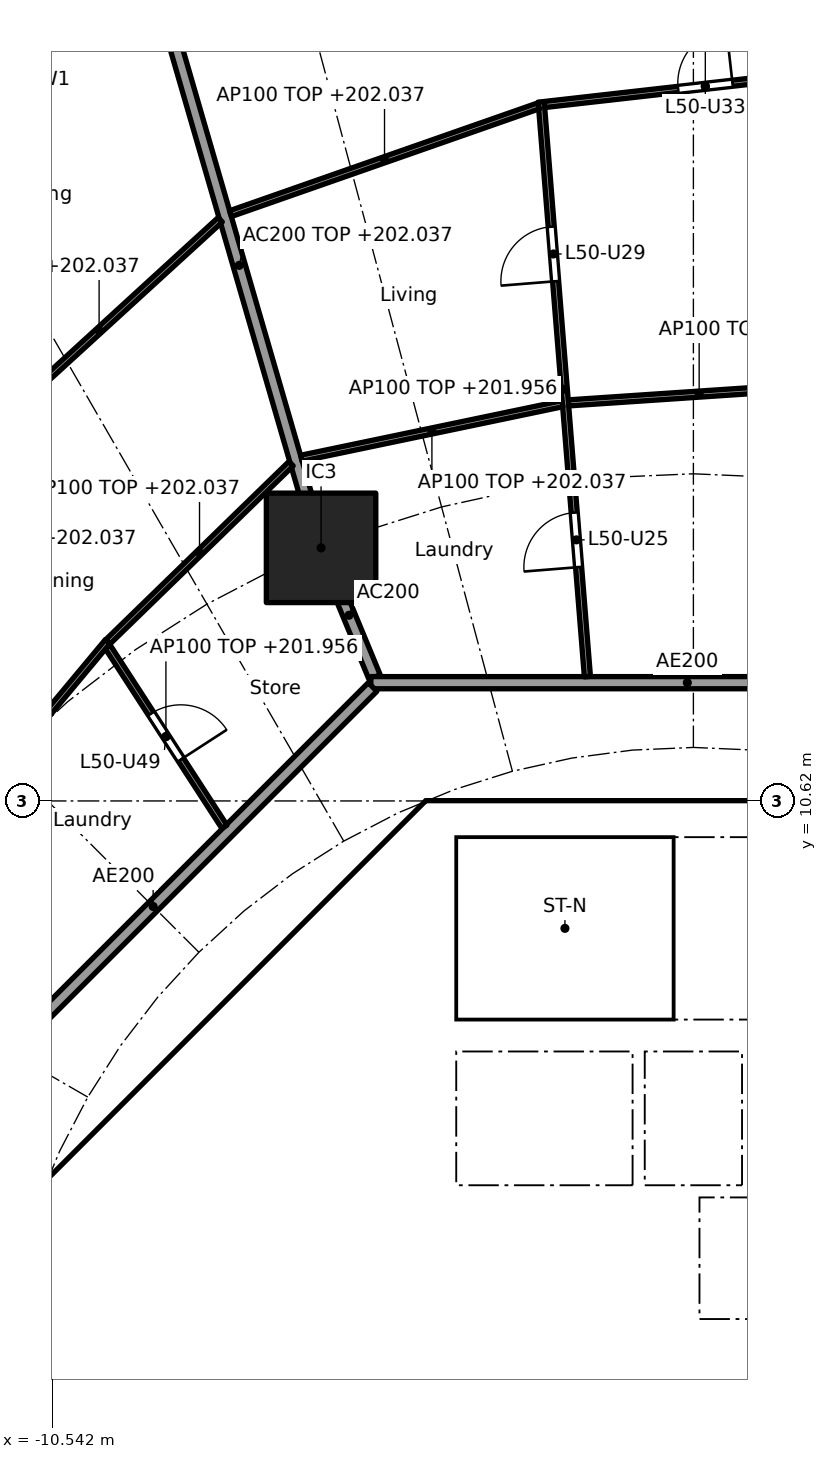
"""IFC4 building model, lengths in metres.
Left out: names, types, materials, properties, quantities, classifications, styles, units other than length and angle.
Written with IfcOpenShell. Run it as: python <this file> out.ifc"""

import sys

from ifc_helpers import new_model, si_unit, direction, frame, frame_2d, origin, origin_2d, place, context, subcontext, project, spatial, polyline, rectangle, outline, extrude, element, fill, save


model = new_model("IFC4")
c1 = context("Model", 3, precision=1e-05, world=origin(), true_north=direction((0.0, 1.0)))
c2 = subcontext(c1, "Body", "Model", "MODEL_VIEW")
j1 = project(units=[si_unit("LENGTHUNIT", "METRE"), si_unit("PLANEANGLEUNIT", "RADIAN")], contexts=[c1])
p1 = place(None, origin())
s1 = spatial("IfcSite", under=j1, at=p1, CompositionType="ELEMENT")
p2 = place(p1, origin())
s2 = spatial("IfcBuilding", under=s1, at=p2, CompositionType="ELEMENT")
p3 = place(p2, frame((0.0, 0.0, 199.2)))
s3 = spatial("IfcBuildingStorey", under=s2, at=p3, CompositionType="ELEMENT", Elevation=199.2)
p4 = place(p3, frame((-6.123, 14.782, 0.0), z_axis=(0.0, 0.0, 1.0), x_axis=(1.0, 0.0, 0.0)))
e1 = element("IfcColumn", 1, at=p4, inside=s3, PredefinedType="COLUMN", context=c2, shape_type="SweptSolid", body=[
    extrude(rectangle(XDim=1.8, YDim=1.8, at=origin_2d()), origin(), (0.0, 0.0, 1.0), 3.7),
])
p5 = place(p3, frame((-11.772, 22.809, 0.0), z_axis=(0.0, 0.0, 1.0), x_axis=(0.796055733703, 0.60522332146, 0.0)))
e2 = element("IfcWall", 2, at=p5, inside=s3, PredefinedType="SOLIDWALL", context=c2, shape_type="SweptSolid", body=[
    extrude(rectangle(XDim=2.917, YDim=0.25, at=frame_2d((1.458, 0.0))), origin(), (0.0, 0.0, 1.0), 3.44),
])
p6 = place(p5, frame((0.408, 0.0, 0.0)))
e3 = element("IfcOpeningElement", 3, at=p6, cuts=e2, PredefinedType="OPENING", context=c2, shape_type="SweptSolid", body=[
    extrude(rectangle(XDim=2.1, YDim=2.4, at=frame_2d((1.05, 1.2))), frame((0.0, 0.135, 0.0), z_axis=(0.0, -1.0, 0.0), x_axis=(1.0, 0.0, 0.0)), (0.0, 0.0, 1.0), 0.27),
])
p7 = place(p3, frame((-4.613, 9.988, 0.0), z_axis=(0.0, 0.0, 1.0), x_axis=(-0.707106781187, -0.707106781187, 0.0)))
e4 = element("IfcWall", 4, at=p7, inside=s3, PredefinedType="SHEAR", context=c2, shape_type="SweptSolid", body=[
    extrude(rectangle(XDim=7.602, YDim=0.6, at=frame_2d((3.801, 0.0))), origin(), (0.0, 0.0, 1.0), 3.44),
])
p8 = place(p7, frame((0.351, 0.0, 0.0)))
e5 = element("IfcOpeningElement", 5, at=p8, cuts=e4, PredefinedType="OPENING", context=c2, shape_type="SweptSolid", body=[
    extrude(rectangle(XDim=1.1, YDim=2.1, at=frame_2d((0.55, 1.05))), frame((0.0, 0.31, 0.0), z_axis=(0.0, -1.0, 0.0), x_axis=(1.0, 0.0, 0.0)), (0.0, 0.0, 1.0), 0.62),
])
p9 = place(p3, frame((-10.325, 3.801, 0.0), z_axis=(0.0, 0.0, 1.0), x_axis=(0.0, -1.0, 0.0)))
e6 = element("IfcWall", 6, at=p9, inside=s3, PredefinedType="SHEAR", context=c2, shape_type="SweptSolid", body=[
    extrude(rectangle(XDim=7.602, YDim=0.6, at=frame_2d((3.801, 0.0))), origin(), (0.0, 0.0, 1.0), 3.44),
])
p10 = place(p9, frame((0.651, 0.0, 0.0)))
e7 = element("IfcOpeningElement", 7, at=p10, cuts=e6, PredefinedType="OPENING", context=c2, shape_type="SweptSolid", body=[
    extrude(rectangle(XDim=1.5, YDim=2.1, at=frame_2d((0.75, 1.05))), frame((0.0, 0.31, 0.0), z_axis=(0.0, -1.0, 0.0), x_axis=(1.0, 0.0, 0.0)), (0.0, 0.0, 1.0), 0.62),
])
p11 = place(p9, frame((5.451, 0.0, 0.0)))
e8 = element("IfcOpeningElement", 8, at=p11, cuts=e6, PredefinedType="OPENING", context=c2, shape_type="SweptSolid", body=[
    extrude(rectangle(XDim=1.5, YDim=2.1, at=frame_2d((0.75, 1.05))), frame((0.0, 0.31, 0.0), z_axis=(0.0, -1.0, 0.0), x_axis=(1.0, 0.0, 0.0)), (0.0, 0.0, 1.0), 0.62),
])
p12 = place(p3, frame((-5.8, 4.3, 0.0), z_axis=(0.0, 0.0, 1.0), x_axis=(0.0, 1.0, 0.0)))
e9 = element("IfcWall", 9, at=p12, inside=s3, PredefinedType="PARTITIONING", context=c2, shape_type="SweptSolid", body=[
    extrude(rectangle(XDim=3.927, YDim=0.15, at=frame_2d((1.963, 0.0))), origin(), (0.0, 0.0, 1.0), 3.44),
])
p13 = place(p12, frame((1.551, 0.0, 0.0)))
e10 = element("IfcOpeningElement", 10, at=p13, cuts=e9, PredefinedType="OPENING", context=c2, shape_type="SweptSolid", body=[
    extrude(rectangle(XDim=0.9, YDim=2.1, at=frame_2d((0.45, 1.05))), frame((0.0, 0.085, 0.0), z_axis=(0.0, -1.0, 0.0), x_axis=(1.0, 0.0, 0.0)), (0.0, 0.0, 1.0), 0.17),
])
p14 = place(p3, frame((-4.0, 4.3, 0.0), z_axis=(0.0, 0.0, 1.0), x_axis=(0.0, 1.0, 0.0)))
e11 = element("IfcWall", 11, at=p14, inside=s3, PredefinedType="SOLIDWALL", context=c2, shape_type="SweptSolid", body=[
    extrude(rectangle(XDim=2.2, YDim=0.2, at=frame_2d((1.1, 0.0))), origin(), (0.0, 0.0, 1.0), 3.44),
])
p15 = place(p14, frame((0.55, 0.0, 0.0)))
e12 = element("IfcOpeningElement", 12, at=p15, cuts=e11, PredefinedType="OPENING", context=c2, shape_type="SweptSolid", body=[
    extrude(rectangle(XDim=1.1, YDim=2.1, at=frame_2d((0.55, 1.05))), frame((0.0, 0.11, 0.0), z_axis=(0.0, -1.0, 0.0), x_axis=(1.0, 0.0, 0.0)), (0.0, 0.0, 1.0), 0.22),
])
p16 = place(p3, frame((-6.7, 2.0, 0.0), z_axis=(0.0, 0.0, 1.0), x_axis=(1.0, 0.0, 0.0)))
e13 = element("IfcWall", 13, at=p16, inside=s3, PredefinedType="SOLIDWALL", context=c2, shape_type="SweptSolid", body=[
    extrude(rectangle(XDim=13.4, YDim=0.2, at=frame_2d((6.7, 0.0))), origin(), (0.0, 0.0, 1.0), 3.44),
])
p17 = place(p16, frame((7.25, 0.0, 0.0)))
e14 = element("IfcOpeningElement", 14, at=p17, cuts=e13, PredefinedType="OPENING", context=c2, shape_type="SweptSolid", body=[
    extrude(rectangle(XDim=1.1, YDim=2.1, at=frame_2d((0.55, 1.05))), frame((0.0, 0.11, 0.0), z_axis=(0.0, -1.0, 0.0), x_axis=(1.0, 0.0, 0.0)), (0.0, 0.0, 1.0), 0.22),
])
p18 = place(p16, frame((9.45, 0.0, 0.0)))
e15 = element("IfcOpeningElement", 15, at=p18, cuts=e13, PredefinedType="OPENING", context=c2, shape_type="SweptSolid", body=[
    extrude(rectangle(XDim=1.1, YDim=2.1, at=frame_2d((0.55, 1.05))), frame((0.0, 0.11, 0.0), z_axis=(0.0, -1.0, 0.0), x_axis=(1.0, 0.0, 0.0)), (0.0, 0.0, 1.0), 0.22),
])
p19 = place(p16, frame((2.95, 0.0, 0.0)))
e16 = element("IfcOpeningElement", 16, at=p19, cuts=e13, PredefinedType="OPENING", context=c2, shape_type="SweptSolid", body=[
    extrude(rectangle(XDim=0.9, YDim=2.1, at=frame_2d((0.45, 1.05))), frame((0.0, 0.11, 0.0), z_axis=(0.0, -1.0, 0.0), x_axis=(1.0, 0.0, 0.0)), (0.0, 0.0, 1.0), 0.22),
])
p20 = place(p3, origin())
e17 = element("IfcWall", 17, at=p20, inside=s3, PredefinedType="SHEAR", context=c2, shape_type="SweptSolid", body=[
    extrude(outline(polyline([(-10.2, 4.825), (-9.776, 4.401), (-10.025, 4.152), (-10.025, 3.801), (-10.625, 3.801), (-10.625, 4.401), (-10.2, 4.825)])), origin(), (0.0, 0.0, 1.0), 3.44),
])
p21 = place(p3, origin())
e18 = element("IfcWall", 18, at=p21, inside=s3, PredefinedType="SHEAR", context=c2, shape_type="SweptSolid", body=[
    extrude(outline(polyline([(-4.152, 10.025), (-4.401, 9.776), (-4.825, 10.2), (-4.401, 10.625), (4.401, 10.625), (4.825, 10.2), (4.401, 9.776), (4.152, 10.025), (-4.152, 10.025)])), origin(), (0.0, 0.0, 1.0), 3.44),
])
for number, where, z_axis, x_axis in (
    (19, (-0.9, 4.3, 0.0), (0.0, 0.0, 1.0), (0.0, 1.0, 0.0)),
    (20, (0.9, 4.3, 0.0), (0.0, 0.0, 1.0), (0.0, 1.0, 0.0)),
):
    element("IfcWall", number, at=place(p3, frame(where, z_axis=z_axis, x_axis=x_axis)), inside=s3, PredefinedType="SOLIDWALL", context=c2, shape_type="SweptSolid", body=[
        extrude(rectangle(XDim=2.2, YDim=0.2, at=frame_2d((1.1, 0.0))), origin(), (0.0, 0.0, 1.0), 3.44),
    ])
p22 = place(p3, origin())
e21 = element("IfcWall", 21, at=p22, inside=s3, PredefinedType="SOLIDWALL", context=c2, shape_type="SweptSolid", body=[
    extrude(outline(polyline([(-6.7, 4.3), (6.7, 4.3), (6.7, 2.1), (6.5, 2.1), (6.5, 4.1), (4.5, 4.1), (4.5, 2.1), (4.3, 2.1), (4.3, 4.1), (2.3, 4.1), (2.3, 2.1), (2.1, 2.1), (2.1, 4.1), (0.1, 4.1), (0.1, 2.1), (-0.1, 2.1), (-0.1, 4.1), (-6.5, 4.1), (-6.5, 2.1), (-6.7, 2.1), (-6.7, 4.3)])), origin(), (0.0, 0.0, 1.0), 3.44),
])
p23 = place(p3, frame((-10.025, 4.0, 0.0), z_axis=(0.0, 0.0, 1.0), x_axis=(1.0, 0.0, 0.0)))
e22 = element("IfcWall", 22, at=p23, inside=s3, PredefinedType="PARTITIONING", context=c2, shape_type="SweptSolid", body=[
    extrude(rectangle(XDim=3.325, YDim=0.2, at=frame_2d((1.662, 0.0))), origin(), (0.0, 0.0, 1.0), 3.44),
])
p24 = place(p3, origin())
e23 = element("IfcWall", 23, at=p24, inside=s3, PredefinedType="SOLIDWALL", context=c2, shape_type="SweptSolid", body=[
    extrude(outline(polyline([(-3.9, 7.025), (-4.1, 7.025), (-4.1, 10.025), (-3.9, 10.025), (-3.9, 7.025)])), origin(), (0.0, 0.0, 1.0), 3.44),
])
p25 = place(p3, origin())
e24 = element("IfcWall", 24, at=p25, inside=s3, PredefinedType="SOLIDWALL", context=c2, shape_type="SweptSolid", body=[
    extrude(outline(polyline([(4.1, 6.5), (-4.1, 6.5), (-4.1, 7.025), (4.1, 7.025), (4.1, 6.5)])), origin(), (0.0, 0.0, 1.0), 3.44),
])
p26 = place(p3, frame((-5.243, 12.657, 0.0), z_axis=(0.0, 0.0, 1.0), x_axis=(-0.382707856524, 0.923869415315, 0.0)))
e25 = element("IfcWall", 25, at=p26, inside=s3, PredefinedType="PARTITIONING", context=c2, shape_type="SweptSolid", body=[
    extrude(rectangle(XDim=2.2, YDim=0.2, at=frame_2d((1.1, 0.0))), origin(), (0.0, 0.0, 1.0), 3.44),
])
p27 = place(p3, frame((-6.137, 14.83, 0.0), z_axis=(0.0, 0.0, 1.0), x_axis=(-0.278461169897, 0.96044748782, 0.0)))
e26 = element("IfcWall", 26, at=p27, inside=s3, PredefinedType="PARTITIONING", context=c2, shape_type="SweptSolid", body=[
    extrude(rectangle(XDim=9.573, YDim=0.2, at=frame_2d((4.787, 0.0))), origin(), (0.0, 0.0, 1.0), 2.837),
])
p28 = place(p3, frame((5.104, 12.565, 0.0), z_axis=(0.0, 0.0, 1.0), x_axis=(-1.0, 0.0, 0.0)))
e27 = element("IfcWall", 27, at=p28, inside=s3, PredefinedType="PARTITIONING", context=c2, shape_type="SweptSolid", body=[
    extrude(rectangle(XDim=10.409, YDim=0.2, at=frame_2d((5.205, 0.0))), origin(), (0.0, 0.0, 1.0), 3.44),
])
p29 = place(p3, frame((-5.275, 12.494, 0.0), z_axis=(0.0, 0.0, 1.0), x_axis=(-0.707106781187, -0.707106781187, 0.0)))
e28 = element("IfcWall", 28, at=p29, inside=s3, PredefinedType="PARTITIONING", context=c2, shape_type="SweptSolid", body=[
    extrude(rectangle(XDim=10.209, YDim=0.2, at=frame_2d((5.104, 0.0))), origin(), (0.0, 0.0, 1.0), 3.44),
])
p30 = place(p3, frame((2.244, 17.455, 0.0), z_axis=(0.0, 0.0, 1.0), x_axis=(-0.997754717554, -0.066974051687, 0.0)))
e29 = element("IfcWall", 29, at=p30, inside=s3, PredefinedType="PARTITIONING", context=c2, shape_type="SweptSolid", body=[
    extrude(rectangle(XDim=4.309, YDim=0.1, at=frame_2d((2.154, 0.0))), origin(), (0.0, 0.0, 1.0), 2.837),
])
p31 = place(p3, frame((2.842, 22.671, 0.0), z_axis=(0.0, 0.0, 1.0), x_axis=(-0.993660315081, -0.112424099879, 0.0)))
e30 = element("IfcWall", 30, at=p31, inside=s3, PredefinedType="PARTITIONING", context=c2, shape_type="SweptSolid", body=[
    extrude(rectangle(XDim=5.325, YDim=0.1, at=frame_2d((2.662, 0.0))), origin(), (0.0, 0.0, 1.0), 2.837),
])
p32 = place(p31, frame((2.212, 0.0, 0.0)))
e31 = element("IfcOpeningElement", 31, at=p32, cuts=e30, PredefinedType="OPENING", context=c2, shape_type="SweptSolid", body=[
    extrude(rectangle(XDim=0.9, YDim=2.1, at=frame_2d((0.45, 1.05))), frame((0.0, 0.06, 0.0), z_axis=(0.0, -1.0, 0.0), x_axis=(1.0, 0.0, 0.0)), (0.0, 0.0, 1.0), 0.12),
])
p33 = place(p3, frame((-1.743, 12.665, 0.0), z_axis=(0.0, 0.0, 1.0), x_axis=(-0.080170892619, 0.996781133437, 0.0)))
e32 = element("IfcWall", 32, at=p33, inside=s3, PredefinedType="PARTITIONING", context=c2, shape_type="SweptSolid", body=[
    extrude(rectangle(XDim=9.483, YDim=0.1, at=frame_2d((4.741, 0.0))), origin(), (0.0, 0.0, 1.0), 2.756),
])
p34 = place(p33, frame((1.806, 0.0, 0.0)))
e33 = element("IfcOpeningElement", 33, at=p34, cuts=e32, PredefinedType="OPENING", context=c2, shape_type="SweptSolid", body=[
    extrude(rectangle(XDim=0.9, YDim=2.1, at=frame_2d((0.45, 1.05))), frame((0.0, 0.06, 0.0), z_axis=(0.0, -1.0, 0.0), x_axis=(1.0, 0.0, 0.0)), (0.0, 0.0, 1.0), 0.12),
])
p35 = place(p33, frame((6.523, 0.0, 0.0)))
e34 = element("IfcOpeningElement", 34, at=p35, cuts=e32, PredefinedType="OPENING", context=c2, shape_type="SweptSolid", body=[
    extrude(rectangle(XDim=0.9, YDim=2.1, at=frame_2d((0.45, 1.05))), frame((0.0, 0.06, 0.0), z_axis=(0.0, -1.0, 0.0), x_axis=(1.0, 0.0, 0.0)), (0.0, 0.0, 1.0), 0.12),
])
p36 = place(p3, frame((-2.154, 17.152, 0.0), z_axis=(0.0, 0.0, 1.0), x_axis=(-0.978906251581, -0.204309937631, 0.0)))
e35 = element("IfcWall", 35, at=p36, inside=s3, PredefinedType="PARTITIONING", context=c2, shape_type="SweptSolid", body=[
    extrude(rectangle(XDim=4.385, YDim=0.1, at=frame_2d((2.193, 0.0))), origin(), (0.0, 0.0, 1.0), 2.837),
])
p37 = place(p3, frame((-2.546, 22.051, 0.0), z_axis=(0.0, 0.0, 1.0), x_axis=(-0.94391294884, -0.330194404878, 0.0)))
e36 = element("IfcWall", 36, at=p37, inside=s3, PredefinedType="PARTITIONING", context=c2, shape_type="SweptSolid", body=[
    extrude(rectangle(XDim=5.367, YDim=0.1, at=frame_2d((2.684, 0.0))), origin(), (0.0, 0.0, 1.0), 2.837),
])
p38 = place(p3, frame((-6.616, 16.166, 0.0), z_axis=(0.0, 0.0, 1.0), x_axis=(-0.716919058692, -0.697156412352, 0.0)))
e37 = element("IfcWall", 37, at=p38, inside=s3, PredefinedType="PARTITIONING", context=c2, shape_type="SweptSolid", body=[
    extrude(rectangle(XDim=4.2, YDim=0.1, at=frame_2d((2.1, 0.0))), origin(), (0.0, 0.0, 1.0), 2.837),
])
p39 = place(p3, frame((-7.781, 20.178, 0.0), z_axis=(0.0, 0.0, 1.0), x_axis=(-0.73807320557, -0.674720640872, 0.0)))
e38 = element("IfcWall", 38, at=p39, inside=s3, PredefinedType="PARTITIONING", context=c2, shape_type="SweptSolid", body=[
    extrude(rectangle(XDim=5.399, YDim=0.1, at=frame_2d((2.699, 0.0))), origin(), (0.0, 0.0, 1.0), 2.837),
])
p40 = place(p3, frame((-7.712, 10.195, 0.0), z_axis=(0.0, 0.0, 1.0), x_axis=(-0.544170086001, 0.838974920663, 0.0)))
e39 = element("IfcWall", 39, at=p40, inside=s3, PredefinedType="PARTITIONING", context=c2, shape_type="SweptSolid", body=[
    extrude(rectangle(XDim=3.535, YDim=0.1, at=frame_2d((1.768, 0.0))), origin(), (0.0, 0.0, 1.0), 2.756),
])
p41 = place(p40, frame((1.318, 0.0, 0.0)))
e40 = element("IfcOpeningElement", 40, at=p41, cuts=e39, PredefinedType="OPENING", context=c2, shape_type="SweptSolid", body=[
    extrude(rectangle(XDim=0.9, YDim=2.1, at=frame_2d((0.45, 1.05))), frame((0.0, 0.06, 0.0), z_axis=(0.0, -1.0, 0.0), x_axis=(1.0, 0.0, 0.0)), (0.0, 0.0, 1.0), 0.12),
])
p42 = place(p3, frame((-9.631, 13.242, 0.0), z_axis=(0.0, 0.0, 1.0), x_axis=(-0.640315711982, -0.768111833647, 0.0)))
e41 = element("IfcWall", 41, at=p42, inside=s3, PredefinedType="PARTITIONING", context=c2, shape_type="SweptSolid", body=[
    extrude(rectangle(XDim=4.572, YDim=0.1, at=frame_2d((2.286, 0.0))), origin(), (0.0, 0.0, 1.0), 2.837),
])
p43 = place(p17, origin())
e42 = element("IfcDoor", 42, at=p43, inside=s3, OperationType="DOUBLE_DOOR_SLIDING", PredefinedType="DOOR", context=c2, shape_type="SweptSolid", body=[
    extrude(rectangle(XDim=1.1, YDim=2.1, at=frame_2d((0.55, 1.05))), frame((0.0, 0.025, 0.0), z_axis=(0.0, -1.0, 0.0), x_axis=(1.0, 0.0, 0.0)), (0.0, 0.0, 1.0), 0.05),
])
fill(e14, e42)
p44 = place(p15, origin())
e43 = element("IfcDoor", 43, at=p44, inside=s3, OperationType="DOUBLE_DOOR_SLIDING", PredefinedType="DOOR", context=c2, shape_type="SweptSolid", body=[
    extrude(rectangle(XDim=1.1, YDim=2.1, at=frame_2d((0.55, 1.05))), frame((0.0, 0.025, 0.0), z_axis=(0.0, -1.0, 0.0), x_axis=(1.0, 0.0, 0.0)), (0.0, 0.0, 1.0), 0.05),
])
fill(e12, e43)
p45 = place(p13, origin())
e44 = element("IfcDoor", 44, at=p45, inside=s3, OperationType="SINGLE_SWING_LEFT", PredefinedType="DOOR", context=c2, shape_type="SweptSolid", body=[
    extrude(rectangle(XDim=0.9, YDim=2.1, at=frame_2d((0.45, 1.05))), frame((0.0, 0.025, 0.0), z_axis=(0.0, -1.0, 0.0), x_axis=(1.0, 0.0, 0.0)), (0.0, 0.0, 1.0), 0.05),
])
fill(e10, e44)
p46 = place(p19, origin())
e45 = element("IfcDoor", 45, at=p46, inside=s3, OperationType="SINGLE_SWING_RIGHT", PredefinedType="DOOR", context=c2, shape_type="SweptSolid", body=[
    extrude(rectangle(XDim=0.9, YDim=2.1, at=frame_2d((0.45, 1.05))), frame((0.0, 0.025, 0.0), z_axis=(0.0, -1.0, 0.0), x_axis=(1.0, 0.0, 0.0)), (0.0, 0.0, 1.0), 0.05),
])
fill(e16, e45)
p47 = place(p10, origin())
e46 = element("IfcDoor", 46, at=p47, inside=s3, OperationType="DOUBLE_DOOR_SINGLE_SWING", PredefinedType="DOOR", context=c2, shape_type="SweptSolid", body=[
    extrude(rectangle(XDim=1.5, YDim=2.1, at=frame_2d((0.75, 1.05))), frame((0.0, 0.025, 0.0), z_axis=(0.0, -1.0, 0.0), x_axis=(1.0, 0.0, 0.0)), (0.0, 0.0, 1.0), 0.05),
])
fill(e7, e46)
p48 = place(p8, origin())
e47 = element("IfcDoor", 47, at=p48, inside=s3, OperationType="SINGLE_SWING_RIGHT", PredefinedType="DOOR", context=c2, shape_type="SweptSolid", body=[
    extrude(rectangle(XDim=1.1, YDim=2.1, at=frame_2d((0.55, 1.05))), frame((0.0, 0.025, 0.0), z_axis=(0.0, -1.0, 0.0), x_axis=(1.0, 0.0, 0.0)), (0.0, 0.0, 1.0), 0.05),
])
fill(e5, e47)
p49 = place(p34, origin())
e48 = element("IfcDoor", 48, at=p49, inside=s3, OperationType="SINGLE_SWING_LEFT", PredefinedType="DOOR", context=c2, shape_type="SweptSolid", body=[
    extrude(rectangle(XDim=0.9, YDim=2.1, at=frame_2d((0.45, 1.05))), frame((0.0, 0.025, 0.0), z_axis=(0.0, -1.0, 0.0), x_axis=(1.0, 0.0, 0.0)), (0.0, 0.0, 1.0), 0.05),
])
fill(e33, e48)
p50 = place(p35, origin())
e49 = element("IfcDoor", 49, at=p50, inside=s3, OperationType="SINGLE_SWING_LEFT", PredefinedType="DOOR", context=c2, shape_type="SweptSolid", body=[
    extrude(rectangle(XDim=0.9, YDim=2.1, at=frame_2d((0.45, 1.05))), frame((0.0, 0.025, 0.0), z_axis=(0.0, -1.0, 0.0), x_axis=(1.0, 0.0, 0.0)), (0.0, 0.0, 1.0), 0.05),
])
fill(e34, e49)
p51 = place(p32, frame((0.9, 0.0, 0.0), x_axis=(-1.0, 0.0, 0.0)))
e50 = element("IfcDoor", 50, at=p51, inside=s3, OperationType="SINGLE_SWING_RIGHT", PredefinedType="DOOR", context=c2, shape_type="SweptSolid", body=[
    extrude(rectangle(XDim=0.9, YDim=2.1, at=frame_2d((0.45, 1.05))), frame((0.0, 0.025, 0.0), z_axis=(0.0, -1.0, 0.0), x_axis=(1.0, 0.0, 0.0)), (0.0, 0.0, 1.0), 0.05),
])
fill(e31, e50)
p52 = place(p41, frame((0.9, 0.0, 0.0), x_axis=(-1.0, 0.0, 0.0)))
e51 = element("IfcDoor", 51, at=p52, inside=s3, OperationType="SINGLE_SWING_RIGHT", PredefinedType="DOOR", context=c2, shape_type="SweptSolid", body=[
    extrude(rectangle(XDim=0.9, YDim=2.1, at=frame_2d((0.45, 1.05))), frame((0.0, 0.025, 0.0), z_axis=(0.0, -1.0, 0.0), x_axis=(1.0, 0.0, 0.0)), (0.0, 0.0, 1.0), 0.05),
])
fill(e40, e51)
save(model, sys.argv[1])
